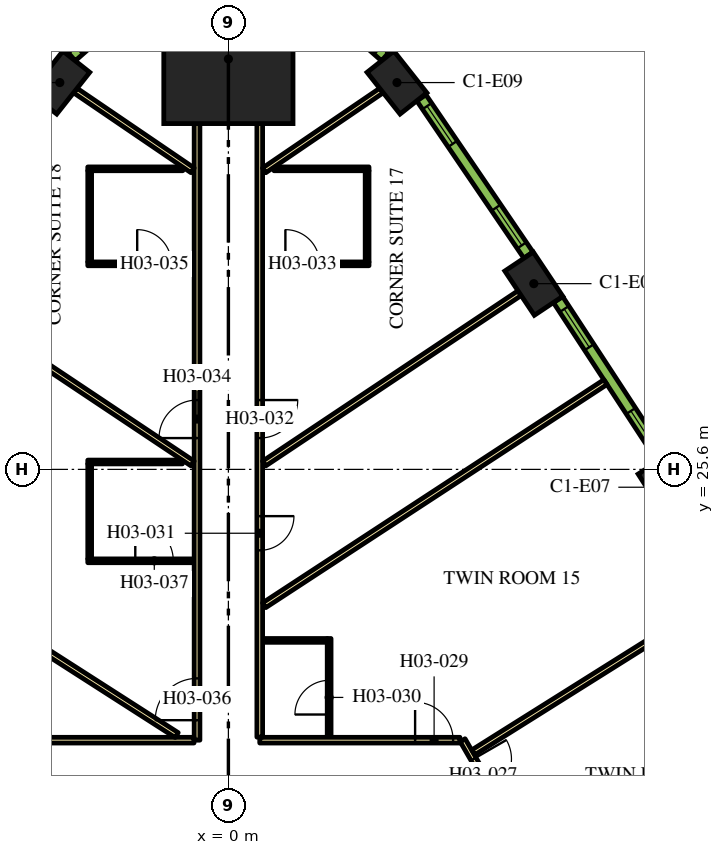
"""IFC4 building model, lengths in metres.
Left out: names, types, materials, properties, quantities, classifications, styles, units other than length and angle.
Written with IfcOpenShell. Run it as: python <this file> out.ifc"""

import sys

from ifc_helpers import new_model, si_unit, direction, frame, frame_2d, origin, origin_2d, place, context, subcontext, project, spatial, rectangle, extrude, element, fill, save


model = new_model("IFC4")
c1 = context("Model", 3, precision=1e-05, world=origin(), true_north=direction((0.0, 1.0)))
c2 = subcontext(c1, "Body", "Model", "MODEL_VIEW")
j1 = project(units=[si_unit("LENGTHUNIT", "METRE"), si_unit("PLANEANGLEUNIT", "RADIAN")], contexts=[c1])
p1 = place(None, origin())
s1 = spatial("IfcSite", under=j1, at=p1, CompositionType="ELEMENT")
p2 = place(p1, origin())
s2 = spatial("IfcBuilding", under=s1, at=p2, CompositionType="ELEMENT")
p3 = place(p2, frame((0.0, 0.0, 51.0)))
s3 = spatial("IfcBuildingStorey", under=s2, at=p3, CompositionType="ELEMENT", Elevation=51.0)
p4 = place(p3, frame((0.0, 36.399, 0.0), z_axis=(0.0, 0.0, 1.0), x_axis=(0.0, 1.0, 0.0)))
e1 = element("IfcColumn", 1, at=p4, inside=s3, PredefinedType="COLUMN", context=c2, shape_type="SweptSolid", body=[
    extrude(rectangle(XDim=3.4, YDim=3.4, at=origin_2d()), origin(), (0.0, 0.0, 1.0), 3.9),
])
for number, where, z_axis, x_axis in (
    (2, (11.539, 25.131, 0.0), (0.0, 0.0, 1.0), (-0.539, 0.842, 0.0)),
    (3, (8.037, 30.487, 0.0), (0.0, 0.0, 1.0), (-0.555, 0.832, 0.0)),
    (4, (4.436, 35.778, 0.0), (0.0, 0.0, 1.0), (-0.62, 0.784, 0.0)),
    (5, (-4.436, 35.778, 0.0), (0.0, 0.0, 1.0), (-0.62, -0.784, 0.0)),
):
    element("IfcColumn", number, at=place(p3, frame(where, z_axis=z_axis, x_axis=x_axis)), inside=s3, PredefinedType="COLUMN", context=c2, shape_type="SweptSolid", body=[
        extrude(rectangle(XDim=1.4, YDim=0.9, at=origin_2d()), origin(), (0.0, 0.0, 1.0), 3.9),
    ])
p5 = place(p3, frame((6.163, 18.475, 0.0), z_axis=(0.0, 0.0, 1.0), x_axis=(0.500001317485, -0.866024643133, 0.0)))
e6 = element("IfcWall", 6, at=p5, inside=s3, PredefinedType="PARTITIONING", context=c2, shape_type="SweptSolid", body=[
    extrude(rectangle(XDim=25.767, YDim=0.15, at=frame_2d((12.883, 0.0))), origin(), (0.0, 0.0, 1.0), 2.75),
])
p6 = place(p5, frame((24.586, 0.0, 0.0)))
e7 = element("IfcOpeningElement", 7, at=p6, cuts=e6, PredefinedType="OPENING", context=c2, shape_type="SweptSolid", body=[
    extrude(rectangle(XDim=1.0, YDim=2.1, at=frame_2d((0.5, 1.05))), frame((0.0, 0.085, 0.0), z_axis=(0.0, -1.0, 0.0), x_axis=(1.0, 0.0, 0.0)), (0.0, 0.0, 1.0), 0.17),
])
p7 = place(p5, frame((13.144, 0.0, 0.0)))
e8 = element("IfcOpeningElement", 8, at=p7, cuts=e6, PredefinedType="OPENING", context=c2, shape_type="SweptSolid", body=[
    extrude(rectangle(XDim=1.0, YDim=2.1, at=frame_2d((0.5, 1.05))), frame((0.0, 0.085, 0.0), z_axis=(0.0, -1.0, 0.0), x_axis=(1.0, 0.0, 0.0)), (0.0, 0.0, 1.0), 0.17),
])
p8 = place(p5, frame((11.692, 0.0, 0.0)))
e9 = element("IfcOpeningElement", 9, at=p8, cuts=e6, PredefinedType="OPENING", context=c2, shape_type="SweptSolid", body=[
    extrude(rectangle(XDim=1.0, YDim=2.1, at=frame_2d((0.5, 1.05))), frame((0.0, 0.085, 0.0), z_axis=(0.0, -1.0, 0.0), x_axis=(1.0, 0.0, 0.0)), (0.0, 0.0, 1.0), 0.17),
])
p9 = place(p5, frame((0.572, 0.0, 0.0)))
e10 = element("IfcOpeningElement", 10, at=p9, cuts=e6, PredefinedType="OPENING", context=c2, shape_type="SweptSolid", body=[
    extrude(rectangle(XDim=1.0, YDim=2.1, at=frame_2d((0.5, 1.05))), frame((0.0, 0.085, 0.0), z_axis=(0.0, -1.0, 0.0), x_axis=(1.0, 0.0, 0.0)), (0.0, 0.0, 1.0), 0.17),
])
p10 = place(p3, frame((0.825, 18.475, 0.0), z_axis=(0.0, 0.0, 1.0), x_axis=(1.0, 0.0, 0.0)))
e11 = element("IfcWall", 11, at=p10, inside=s3, PredefinedType="PARTITIONING", context=c2, shape_type="SweptSolid", body=[
    extrude(rectangle(XDim=5.268, YDim=0.15, at=frame_2d((2.634, 0.0))), origin(), (0.0, 0.0, 1.0), 2.75),
])
p11 = place(p10, frame((4.088, 0.0, 0.0)))
e12 = element("IfcOpeningElement", 12, at=p11, cuts=e11, PredefinedType="OPENING", context=c2, shape_type="SweptSolid", body=[
    extrude(rectangle(XDim=1.0, YDim=2.1, at=frame_2d((0.5, 1.05))), frame((0.0, 0.085, 0.0), z_axis=(0.0, -1.0, 0.0), x_axis=(1.0, 0.0, 0.0)), (0.0, 0.0, 1.0), 0.17),
])
p12 = place(p3, frame((0.825, 34.699, 0.0), z_axis=(0.0, 0.0, 1.0), x_axis=(0.0, -1.0, 0.0)))
e13 = element("IfcWall", 13, at=p12, inside=s3, PredefinedType="PARTITIONING", context=c2, shape_type="SweptSolid", body=[
    extrude(rectangle(XDim=16.144, YDim=0.15, at=frame_2d((8.072, 0.0))), origin(), (0.0, 0.0, 1.0), 2.75),
])
p13 = place(p12, frame((10.329, 0.0, 0.0)))
e14 = element("IfcOpeningElement", 14, at=p13, cuts=e13, PredefinedType="OPENING", context=c2, shape_type="SweptSolid", body=[
    extrude(rectangle(XDim=0.9, YDim=2.1, at=frame_2d((0.45, 1.05))), frame((0.0, 0.085, 0.0), z_axis=(0.0, -1.0, 0.0), x_axis=(1.0, 0.0, 0.0)), (0.0, 0.0, 1.0), 0.17),
])
p14 = place(p12, frame((7.275, 0.0, 0.0)))
e15 = element("IfcOpeningElement", 15, at=p14, cuts=e13, PredefinedType="OPENING", context=c2, shape_type="SweptSolid", body=[
    extrude(rectangle(XDim=1.0, YDim=2.1, at=frame_2d((0.5, 1.05))), frame((0.0, 0.085, 0.0), z_axis=(0.0, -1.0, 0.0), x_axis=(1.0, 0.0, 0.0)), (0.0, 0.0, 1.0), 0.17),
])
p15 = place(p3, frame((-0.825, 18.475, 0.0), z_axis=(0.0, 0.0, 1.0), x_axis=(0.0, 1.0, 0.0)))
e16 = element("IfcWall", 16, at=p15, inside=s3, PredefinedType="PARTITIONING", context=c2, shape_type="SweptSolid", body=[
    extrude(rectangle(XDim=16.224, YDim=0.15, at=frame_2d((8.112, 0.0))), origin(), (0.0, 0.0, 1.0), 2.75),
])
p16 = place(p15, frame((7.949, 0.0, 0.0)))
e17 = element("IfcOpeningElement", 17, at=p16, cuts=e16, PredefinedType="OPENING", context=c2, shape_type="SweptSolid", body=[
    extrude(rectangle(XDim=1.0, YDim=2.1, at=frame_2d((0.5, 1.05))), frame((0.0, 0.085, 0.0), z_axis=(0.0, -1.0, 0.0), x_axis=(1.0, 0.0, 0.0)), (0.0, 0.0, 1.0), 0.17),
])
p17 = place(p15, frame((0.526, 0.0, 0.0)))
e18 = element("IfcOpeningElement", 18, at=p17, cuts=e16, PredefinedType="OPENING", context=c2, shape_type="SweptSolid", body=[
    extrude(rectangle(XDim=1.1, YDim=2.1, at=frame_2d((0.55, 1.05))), frame((0.0, 0.085, 0.0), z_axis=(0.0, -1.0, 0.0), x_axis=(1.0, 0.0, 0.0)), (0.0, 0.0, 1.0), 0.17),
])
p18 = place(p3, frame((-6.163, 18.475, 0.0), z_axis=(0.0, 0.0, 1.0), x_axis=(1.0, 0.0, 0.0)))
e19 = element("IfcWall", 19, at=p18, inside=s3, PredefinedType="PARTITIONING", context=c2, shape_type="SweptSolid", body=[
    extrude(rectangle(XDim=5.258, YDim=0.15, at=frame_2d((2.629, 0.0))), origin(), (0.0, 0.0, 1.0), 2.75),
])
p19 = place(p3, frame((-4.028, 35.569, 0.0), z_axis=(0.0, 0.0, 1.0), x_axis=(0.826700206326, -0.56264266534, 0.0)))
e20 = element("IfcWall", 20, at=p19, inside=s3, PredefinedType="PARTITIONING", context=c2, shape_type="SweptSolid", body=[
    extrude(rectangle(XDim=3.733, YDim=0.15, at=frame_2d((1.867, 0.0))), origin(), (0.0, 0.0, 1.0), 2.75),
])
p20 = place(p3, frame((-11.16, 24.888, 0.0), z_axis=(0.0, 0.0, 1.0), x_axis=(0.84199813156, -0.539480441211, 0.0)))
e21 = element("IfcWall", 21, at=p20, inside=s3, PredefinedType="PARTITIONING", context=c2, shape_type="SweptSolid", body=[
    extrude(rectangle(XDim=11.638, YDim=0.15, at=frame_2d((5.819, 0.0))), origin(), (0.0, 0.0, 1.0), 2.75),
])
p21 = place(p3, frame((-7.662, 30.238, 0.0), z_axis=(0.0, 0.0, 1.0), x_axis=(0.831882886825, -0.554951225431, 0.0)))
e22 = element("IfcWall", 22, at=p21, inside=s3, PredefinedType="PARTITIONING", context=c2, shape_type="SweptSolid", body=[
    extrude(rectangle(XDim=8.079, YDim=0.15, at=frame_2d((4.04, 0.0))), origin(), (0.0, 0.0, 1.0), 2.75),
])
p22 = place(p3, frame((9.922, 27.896, 0.0), z_axis=(0.0, 0.0, 1.0), x_axis=(-0.836970816595, -0.547247523675, 0.0)))
e23 = element("IfcWall", 23, at=p22, inside=s3, PredefinedType="PARTITIONING", context=c2, shape_type="SweptSolid", body=[
    extrude(rectangle(XDim=10.729, YDim=0.15, at=frame_2d((5.364, 0.0))), origin(), (0.0, 0.0, 1.0), 2.75),
])
p23 = place(p3, frame((7.662, 30.238, 0.0), z_axis=(0.0, 0.0, 1.0), x_axis=(-0.831882886825, -0.554951225431, 0.0)))
e24 = element("IfcWall", 24, at=p23, inside=s3, PredefinedType="PARTITIONING", context=c2, shape_type="SweptSolid", body=[
    extrude(rectangle(XDim=8.079, YDim=0.15, at=frame_2d((4.04, 0.0))), origin(), (0.0, 0.0, 1.0), 2.75),
])
p24 = place(p3, frame((4.028, 35.569, 0.0), z_axis=(0.0, 0.0, 1.0), x_axis=(-0.826700206326, -0.56264266534, 0.0)))
e25 = element("IfcWall", 25, at=p24, inside=s3, PredefinedType="PARTITIONING", context=c2, shape_type="SweptSolid", body=[
    extrude(rectangle(XDim=3.733, YDim=0.15, at=frame_2d((1.867, 0.0))), origin(), (0.0, 0.0, 1.0), 2.75),
])
p25 = place(p3, frame((13.376, 22.506, 0.0), z_axis=(0.0, 0.0, 1.0), x_axis=(-0.846945608893, -0.531679542183, 0.0)))
e26 = element("IfcWall", 26, at=p25, inside=s3, PredefinedType="PARTITIONING", context=c2, shape_type="SweptSolid", body=[
    extrude(rectangle(XDim=8.182, YDim=0.15, at=frame_2d((4.091, 0.0))), origin(), (0.0, 0.0, 1.0), 2.75),
])
p26 = place(p3, frame((2.651, 18.55, 0.0), z_axis=(0.0, 0.0, 1.0), x_axis=(0.0, 1.0, 0.0)))
e27 = element("IfcWall", 27, at=p26, inside=s3, PredefinedType="PARTITIONING", context=c2, shape_type="SweptSolid", body=[
    extrude(rectangle(XDim=2.6, YDim=0.1, at=frame_2d((1.3, 0.0))), origin(), (0.0, 0.0, 1.0), 2.75),
])
p27 = place(p26, frame((0.6, 0.0, 0.0)))
e28 = element("IfcOpeningElement", 28, at=p27, cuts=e27, PredefinedType="OPENING", context=c2, shape_type="SweptSolid", body=[
    extrude(rectangle(XDim=0.9, YDim=2.1, at=frame_2d((0.45, 1.05))), frame((0.0, 0.06, 0.0), z_axis=(0.0, -1.0, 0.0), x_axis=(1.0, 0.0, 0.0)), (0.0, 0.0, 1.0), 0.12),
])
p28 = place(p3, frame((2.601, 21.1, 0.0), z_axis=(0.0, 0.0, 1.0), x_axis=(-1.0, 0.0, 0.0)))
e29 = element("IfcWall", 29, at=p28, inside=s3, PredefinedType="PARTITIONING", context=c2, shape_type="SweptSolid", body=[
    extrude(rectangle(XDim=1.7, YDim=0.1, at=frame_2d((0.85, 0.0))), origin(), (0.0, 0.0, 1.0), 2.75),
])
p29 = place(p3, frame((0.9, 31.009, 0.0), z_axis=(0.0, 0.0, 1.0), x_axis=(1.0, 0.0, 0.0)))
e30 = element("IfcWall", 30, at=p29, inside=s3, PredefinedType="PARTITIONING", context=c2, shape_type="SweptSolid", body=[
    extrude(rectangle(XDim=2.8, YDim=0.1, at=frame_2d((1.4, 0.0))), origin(), (0.0, 0.0, 1.0), 2.75),
])
p30 = place(p29, frame((0.6, 0.0, 0.0)))
e31 = element("IfcOpeningElement", 31, at=p30, cuts=e30, PredefinedType="OPENING", context=c2, shape_type="SweptSolid", body=[
    extrude(rectangle(XDim=0.9, YDim=2.1, at=frame_2d((0.45, 1.05))), frame((0.0, 0.06, 0.0), z_axis=(0.0, -1.0, 0.0), x_axis=(1.0, 0.0, 0.0)), (0.0, 0.0, 1.0), 0.12),
])
p31 = place(p3, frame((3.65, 31.059, 0.0), z_axis=(0.0, 0.0, 1.0), x_axis=(0.0, 1.0, 0.0)))
e32 = element("IfcWall", 32, at=p31, inside=s3, PredefinedType="PARTITIONING", context=c2, shape_type="SweptSolid", body=[
    extrude(rectangle(XDim=2.4, YDim=0.1, at=frame_2d((1.2, 0.0))), origin(), (0.0, 0.0, 1.0), 2.75),
])
p32 = place(p3, frame((1.2, 33.509, 0.0), z_axis=(0.0, 0.0, 1.0), x_axis=(1.0, 0.0, 0.0)))
e33 = element("IfcWall", 33, at=p32, inside=s3, PredefinedType="PARTITIONING", context=c2, shape_type="SweptSolid", body=[
    extrude(rectangle(XDim=2.5, YDim=0.1, at=frame_2d((1.25, 0.0))), origin(), (0.0, 0.0, 1.0), 2.75),
])
p33 = place(p3, frame((-3.7, 31.009, 0.0), z_axis=(0.0, 0.0, 1.0), x_axis=(1.0, 0.0, 0.0)))
e34 = element("IfcWall", 34, at=p33, inside=s3, PredefinedType="PARTITIONING", context=c2, shape_type="SweptSolid", body=[
    extrude(rectangle(XDim=2.8, YDim=0.1, at=frame_2d((1.4, 0.0))), origin(), (0.0, 0.0, 1.0), 2.75),
])
p34 = place(p33, frame((1.3, 0.0, 0.0)))
e35 = element("IfcOpeningElement", 35, at=p34, cuts=e34, PredefinedType="OPENING", context=c2, shape_type="SweptSolid", body=[
    extrude(rectangle(XDim=0.9, YDim=2.1, at=frame_2d((0.45, 1.05))), frame((0.0, 0.06, 0.0), z_axis=(0.0, -1.0, 0.0), x_axis=(1.0, 0.0, 0.0)), (0.0, 0.0, 1.0), 0.12),
])
p35 = place(p3, frame((-3.65, 31.059, 0.0), z_axis=(0.0, 0.0, 1.0), x_axis=(0.0, 1.0, 0.0)))
e36 = element("IfcWall", 36, at=p35, inside=s3, PredefinedType="PARTITIONING", context=c2, shape_type="SweptSolid", body=[
    extrude(rectangle(XDim=2.4, YDim=0.1, at=frame_2d((1.2, 0.0))), origin(), (0.0, 0.0, 1.0), 2.75),
])
p36 = place(p3, frame((-1.2, 33.509, 0.0), z_axis=(0.0, 0.0, 1.0), x_axis=(-1.0, 0.0, 0.0)))
e37 = element("IfcWall", 37, at=p36, inside=s3, PredefinedType="PARTITIONING", context=c2, shape_type="SweptSolid", body=[
    extrude(rectangle(XDim=2.5, YDim=0.1, at=frame_2d((1.25, 0.0))), origin(), (0.0, 0.0, 1.0), 2.75),
])
p37 = place(p3, frame((-3.7, 23.195, 0.0), z_axis=(0.0, 0.0, 1.0), x_axis=(1.0, 0.0, 0.0)))
e38 = element("IfcWall", 38, at=p37, inside=s3, PredefinedType="PARTITIONING", context=c2, shape_type="SweptSolid", body=[
    extrude(rectangle(XDim=2.8, YDim=0.1, at=frame_2d((1.4, 0.0))), origin(), (0.0, 0.0, 1.0), 2.75),
])
p38 = place(p37, frame((1.25, 0.0, 0.0)))
e39 = element("IfcOpeningElement", 39, at=p38, cuts=e38, PredefinedType="OPENING", context=c2, shape_type="SweptSolid", body=[
    extrude(rectangle(XDim=1.0, YDim=2.1, at=frame_2d((0.5, 1.05))), frame((0.0, 0.06, 0.0), z_axis=(0.0, -1.0, 0.0), x_axis=(1.0, 0.0, 0.0)), (0.0, 0.0, 1.0), 0.12),
])
p39 = place(p3, frame((-3.65, 23.245, 0.0), z_axis=(0.0, 0.0, 1.0), x_axis=(0.0, 1.0, 0.0)))
e40 = element("IfcWall", 40, at=p39, inside=s3, PredefinedType="PARTITIONING", context=c2, shape_type="SweptSolid", body=[
    extrude(rectangle(XDim=2.5, YDim=0.1, at=frame_2d((1.25, 0.0))), origin(), (0.0, 0.0, 1.0), 2.75),
])
p40 = place(p3, frame((-1.21, 25.795, 0.0), z_axis=(0.0, 0.0, 1.0), x_axis=(-1.0, 0.0, 0.0)))
e41 = element("IfcWall", 41, at=p40, inside=s3, PredefinedType="PARTITIONING", context=c2, shape_type="SweptSolid", body=[
    extrude(rectangle(XDim=2.49, YDim=0.1, at=frame_2d((1.245, 0.0))), origin(), (0.0, 0.0, 1.0), 2.75),
])
p41 = place(p3, frame((11.411, 25.884, 0.0), z_axis=(0.0, 0.0, 1.0), x_axis=(-0.547204617628, 0.836998868845, 0.0)))
e42 = element("IfcWall", 42, at=p41, inside=s3, PredefinedType="SOLIDWALL", context=c2, shape_type="SweptSolid", body=[
    extrude(rectangle(XDim=4.998, YDim=0.29, at=frame_2d((2.499, 0.0))), origin(), (0.0, 0.0, 1.0), 3.65),
])
p42 = place(p41, frame((0.297, 0.0, 0.9)))
e43 = element("IfcOpeningElement", 43, at=p42, cuts=e42, PredefinedType="OPENING", context=c2, shape_type="SweptSolid", body=[
    extrude(rectangle(XDim=1.2, YDim=2.15, at=frame_2d((0.6, 1.075))), frame((0.0, 0.155, 0.0), z_axis=(0.0, -1.0, 0.0), x_axis=(1.0, 0.0, 0.0)), (0.0, 0.0, 1.0), 0.31),
])
p43 = place(p41, frame((3.501, 0.0, 0.9)))
e44 = element("IfcOpeningElement", 44, at=p43, cuts=e42, PredefinedType="OPENING", context=c2, shape_type="SweptSolid", body=[
    extrude(rectangle(XDim=1.2, YDim=2.15, at=frame_2d((0.6, 1.075))), frame((0.0, 0.155, 0.0), z_axis=(0.0, -1.0, 0.0), x_axis=(1.0, 0.0, 0.0)), (0.0, 0.0, 1.0), 0.31),
])
p44 = place(p3, frame((7.895, 31.238, 0.0), z_axis=(0.0, 0.0, 1.0), x_axis=(-0.562610153679, 0.826722332454, 0.0)))
e45 = element("IfcWall", 45, at=p44, inside=s3, PredefinedType="SOLIDWALL", context=c2, shape_type="SweptSolid", body=[
    extrude(rectangle(XDim=5.006, YDim=0.29, at=frame_2d((2.503, 0.0))), origin(), (0.0, 0.0, 1.0), 3.65),
])
p45 = place(p44, frame((0.31, 0.0, 0.9)))
e46 = element("IfcOpeningElement", 46, at=p45, cuts=e45, PredefinedType="OPENING", context=c2, shape_type="SweptSolid", body=[
    extrude(rectangle(XDim=1.2, YDim=2.15, at=frame_2d((0.6, 1.075))), frame((0.0, 0.155, 0.0), z_axis=(0.0, -1.0, 0.0), x_axis=(1.0, 0.0, 0.0)), (0.0, 0.0, 1.0), 0.31),
])
p46 = place(p44, frame((3.541, 0.0, 0.9)))
e47 = element("IfcOpeningElement", 47, at=p46, cuts=e45, PredefinedType="OPENING", context=c2, shape_type="SweptSolid", body=[
    extrude(rectangle(XDim=1.2, YDim=2.15, at=frame_2d((0.6, 1.075))), frame((0.0, 0.155, 0.0), z_axis=(0.0, -1.0, 0.0), x_axis=(1.0, 0.0, 0.0)), (0.0, 0.0, 1.0), 0.31),
])
p47 = place(p3, frame((4.125, 36.459, 0.0), z_axis=(0.0, 0.0, 1.0), x_axis=(-0.749812680302, 0.661650167731, 0.0)))
e48 = element("IfcWall", 48, at=p47, inside=s3, PredefinedType="SOLIDWALL", context=c2, shape_type="SweptSolid", body=[
    extrude(rectangle(XDim=1.415, YDim=0.29, at=frame_2d((0.708, 0.0))), origin(), (0.0, 0.0, 1.0), 3.65),
])
p48 = place(p47, frame((0.258, 0.0, 0.9)))
e49 = element("IfcOpeningElement", 49, at=p48, cuts=e48, PredefinedType="OPENING", context=c2, shape_type="SweptSolid", body=[
    extrude(rectangle(XDim=0.9, YDim=2.15, at=frame_2d((0.45, 1.075))), frame((0.0, 0.155, 0.0), z_axis=(0.0, -1.0, 0.0), x_axis=(1.0, 0.0, 0.0)), (0.0, 0.0, 1.0), 0.31),
])
p49 = place(p3, frame((-3.064, 37.395, 0.0), z_axis=(0.0, 0.0, 1.0), x_axis=(-0.749812680302, -0.661650167731, 0.0)))
e50 = element("IfcWall", 50, at=p49, inside=s3, PredefinedType="SOLIDWALL", context=c2, shape_type="SweptSolid", body=[
    extrude(rectangle(XDim=1.415, YDim=0.29, at=frame_2d((0.708, 0.0))), origin(), (0.0, 0.0, 1.0), 3.65),
])
p50 = place(p49, frame((0.258, 0.0, 0.9)))
e51 = element("IfcOpeningElement", 51, at=p50, cuts=e50, PredefinedType="OPENING", context=c2, shape_type="SweptSolid", body=[
    extrude(rectangle(XDim=0.9, YDim=2.15, at=frame_2d((0.45, 1.075))), frame((0.0, 0.155, 0.0), z_axis=(0.0, -1.0, 0.0), x_axis=(1.0, 0.0, 0.0)), (0.0, 0.0, 1.0), 0.31),
])
p51 = place(p9, origin())
e52 = element("IfcDoor", 52, at=p51, inside=s3, OperationType="SINGLE_SWING_LEFT", PredefinedType="DOOR", context=c2, shape_type="SweptSolid", body=[
    extrude(rectangle(XDim=1.0, YDim=2.1, at=frame_2d((0.5, 1.05))), frame((0.0, 0.025, 0.0), z_axis=(0.0, -1.0, 0.0), x_axis=(1.0, 0.0, 0.0)), (0.0, 0.0, 1.0), 0.05),
])
fill(e10, e52)
p52 = place(p11, origin())
e53 = element("IfcDoor", 53, at=p52, inside=s3, OperationType="SINGLE_SWING_RIGHT", PredefinedType="DOOR", context=c2, shape_type="SweptSolid", body=[
    extrude(rectangle(XDim=1.0, YDim=2.1, at=frame_2d((0.5, 1.05))), frame((0.0, 0.025, 0.0), z_axis=(0.0, -1.0, 0.0), x_axis=(1.0, 0.0, 0.0)), (0.0, 0.0, 1.0), 0.05),
])
fill(e12, e53)
p53 = place(p27, origin())
e54 = element("IfcDoor", 54, at=p53, inside=s3, OperationType="SINGLE_SWING_RIGHT", PredefinedType="DOOR", context=c2, shape_type="SweptSolid", body=[
    extrude(rectangle(XDim=0.9, YDim=2.1, at=frame_2d((0.45, 1.05))), frame((0.0, 0.025, 0.0), z_axis=(0.0, -1.0, 0.0), x_axis=(1.0, 0.0, 0.0)), (0.0, 0.0, 1.0), 0.05),
])
fill(e28, e54)
p54 = place(p13, origin())
e55 = element("IfcDoor", 55, at=p54, inside=s3, OperationType="SINGLE_SWING_RIGHT", PredefinedType="DOOR", context=c2, shape_type="SweptSolid", body=[
    extrude(rectangle(XDim=0.9, YDim=2.1, at=frame_2d((0.45, 1.05))), frame((0.0, 0.025, 0.0), z_axis=(0.0, -1.0, 0.0), x_axis=(1.0, 0.0, 0.0)), (0.0, 0.0, 1.0), 0.05),
])
fill(e14, e55)
p55 = place(p14, origin())
e56 = element("IfcDoor", 56, at=p55, inside=s3, OperationType="SINGLE_SWING_RIGHT", PredefinedType="DOOR", context=c2, shape_type="SweptSolid", body=[
    extrude(rectangle(XDim=1.0, YDim=2.1, at=frame_2d((0.5, 1.05))), frame((0.0, 0.025, 0.0), z_axis=(0.0, -1.0, 0.0), x_axis=(1.0, 0.0, 0.0)), (0.0, 0.0, 1.0), 0.05),
])
fill(e15, e56)
p56 = place(p30, origin())
e57 = element("IfcDoor", 57, at=p56, inside=s3, OperationType="SINGLE_SWING_LEFT", PredefinedType="DOOR", context=c2, shape_type="SweptSolid", body=[
    extrude(rectangle(XDim=0.9, YDim=2.1, at=frame_2d((0.45, 1.05))), frame((0.0, 0.025, 0.0), z_axis=(0.0, -1.0, 0.0), x_axis=(1.0, 0.0, 0.0)), (0.0, 0.0, 1.0), 0.05),
])
fill(e31, e57)
p57 = place(p16, origin())
e58 = element("IfcDoor", 58, at=p57, inside=s3, OperationType="SINGLE_SWING_LEFT", PredefinedType="DOOR", context=c2, shape_type="SweptSolid", body=[
    extrude(rectangle(XDim=1.0, YDim=2.1, at=frame_2d((0.5, 1.05))), frame((0.0, 0.025, 0.0), z_axis=(0.0, -1.0, 0.0), x_axis=(1.0, 0.0, 0.0)), (0.0, 0.0, 1.0), 0.05),
])
fill(e17, e58)
p58 = place(p34, origin())
e59 = element("IfcDoor", 59, at=p58, inside=s3, OperationType="SINGLE_SWING_RIGHT", PredefinedType="DOOR", context=c2, shape_type="SweptSolid", body=[
    extrude(rectangle(XDim=0.9, YDim=2.1, at=frame_2d((0.45, 1.05))), frame((0.0, 0.025, 0.0), z_axis=(0.0, -1.0, 0.0), x_axis=(1.0, 0.0, 0.0)), (0.0, 0.0, 1.0), 0.05),
])
fill(e35, e59)
p59 = place(p17, origin())
e60 = element("IfcDoor", 60, at=p59, inside=s3, OperationType="SINGLE_SWING_LEFT", PredefinedType="DOOR", context=c2, shape_type="SweptSolid", body=[
    extrude(rectangle(XDim=1.1, YDim=2.1, at=frame_2d((0.55, 1.05))), frame((0.0, 0.025, 0.0), z_axis=(0.0, -1.0, 0.0), x_axis=(1.0, 0.0, 0.0)), (0.0, 0.0, 1.0), 0.05),
])
fill(e18, e60)
p60 = place(p38, origin())
e61 = element("IfcDoor", 61, at=p60, inside=s3, OperationType="SINGLE_SWING_LEFT", PredefinedType="DOOR", context=c2, shape_type="SweptSolid", body=[
    extrude(rectangle(XDim=1.0, YDim=2.1, at=frame_2d((0.5, 1.05))), frame((0.0, 0.025, 0.0), z_axis=(0.0, -1.0, 0.0), x_axis=(1.0, 0.0, 0.0)), (0.0, 0.0, 1.0), 0.05),
])
fill(e39, e61)
p61 = place(p42, origin())
e62 = element("IfcWindow", 62, at=p61, inside=s3, PartitioningType="DOUBLE_PANEL_VERTICAL", PredefinedType="WINDOW", context=c2, shape_type="SweptSolid", body=[
    extrude(rectangle(XDim=1.2, YDim=2.15, at=frame_2d((0.6, 1.075))), frame((0.0, 0.015, 0.0), z_axis=(0.0, -1.0, 0.0), x_axis=(1.0, 0.0, 0.0)), (0.0, 0.0, 1.0), 0.06),
])
fill(e43, e62)
p62 = place(p43, origin())
e63 = element("IfcWindow", 63, at=p62, inside=s3, PartitioningType="DOUBLE_PANEL_VERTICAL", PredefinedType="WINDOW", context=c2, shape_type="SweptSolid", body=[
    extrude(rectangle(XDim=1.2, YDim=2.15, at=frame_2d((0.6, 1.075))), frame((0.0, 0.015, 0.0), z_axis=(0.0, -1.0, 0.0), x_axis=(1.0, 0.0, 0.0)), (0.0, 0.0, 1.0), 0.06),
])
fill(e44, e63)
p63 = place(p45, origin())
e64 = element("IfcWindow", 64, at=p63, inside=s3, PartitioningType="DOUBLE_PANEL_VERTICAL", PredefinedType="WINDOW", context=c2, shape_type="SweptSolid", body=[
    extrude(rectangle(XDim=1.2, YDim=2.15, at=frame_2d((0.6, 1.075))), frame((0.0, 0.015, 0.0), z_axis=(0.0, -1.0, 0.0), x_axis=(1.0, 0.0, 0.0)), (0.0, 0.0, 1.0), 0.06),
])
fill(e46, e64)
p64 = place(p46, origin())
e65 = element("IfcWindow", 65, at=p64, inside=s3, PartitioningType="DOUBLE_PANEL_VERTICAL", PredefinedType="WINDOW", context=c2, shape_type="SweptSolid", body=[
    extrude(rectangle(XDim=1.2, YDim=2.15, at=frame_2d((0.6, 1.075))), frame((0.0, 0.015, 0.0), z_axis=(0.0, -1.0, 0.0), x_axis=(1.0, 0.0, 0.0)), (0.0, 0.0, 1.0), 0.06),
])
fill(e47, e65)
save(model, sys.argv[1])
